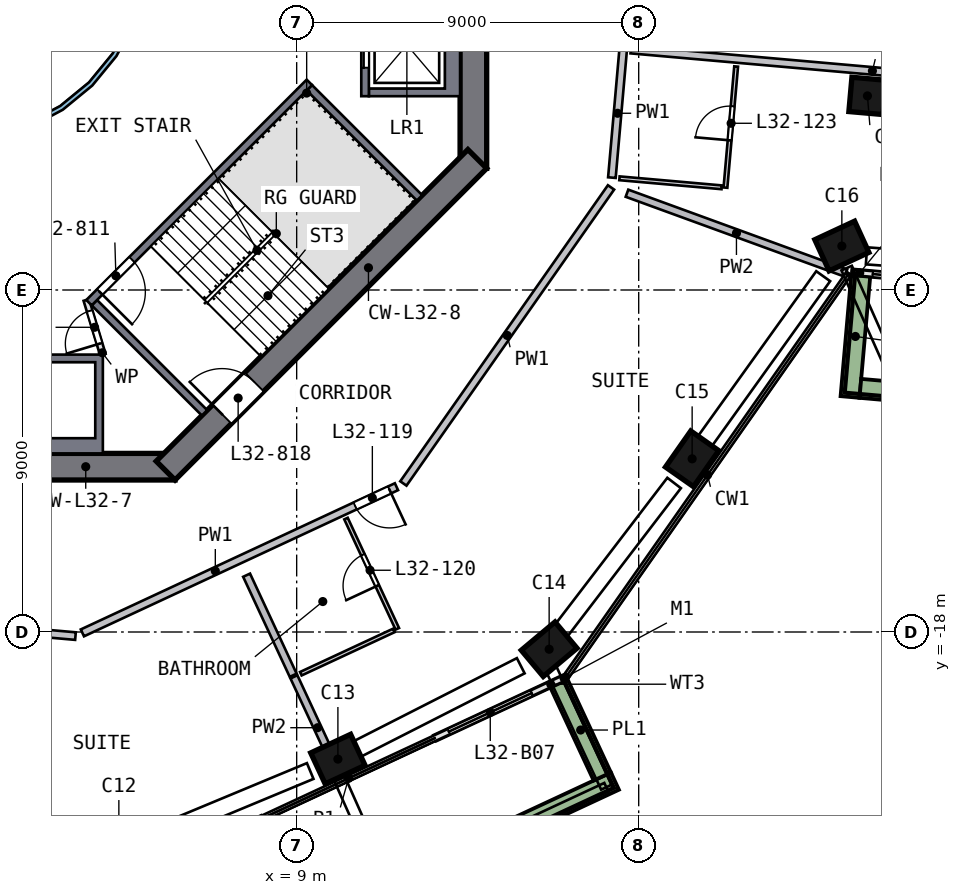
"""IFC4 building model, lengths in metres.
Left out: names, types, materials, properties, quantities, classifications, styles, units other than length and angle.
Written with IfcOpenShell. Run it as: python <this file> out.ifc"""

import sys

from ifc_helpers import new_model, si_unit, direction, frame, frame_2d, origin, origin_2d, place, context, subcontext, project, spatial, polyline, rectangle, outline, extrude, element, fill, save


model = new_model("IFC4")
c1 = context("Model", 3, precision=1e-05, world=origin(), true_north=direction((0.0, 1.0)))
c2 = subcontext(c1, "Body", "Model", "MODEL_VIEW")
j1 = project(units=[si_unit("LENGTHUNIT", "METRE"), si_unit("PLANEANGLEUNIT", "RADIAN")], contexts=[c1])
p1 = place(None, origin())
s1 = spatial("IfcSite", under=j1, at=p1, CompositionType="ELEMENT")
p2 = place(p1, origin())
s2 = spatial("IfcBuilding", under=s1, at=p2, CompositionType="ELEMENT")
p3 = place(p2, frame((0.0, 0.0, 136.5)))
s3 = spatial("IfcBuildingStorey", under=s2, at=p3, CompositionType="ELEMENT", Elevation=136.5)
p4 = place(p3, frame((9.962, -21.403, 0.0), z_axis=(0.101375651, 0.048216176, 0.993679112), x_axis=(0.90094221, 0.419168471, -0.112253848)))
e1 = element("IfcColumn", 1, at=p4, inside=s3, PredefinedType="COLUMN", context=c2, shape_type="SweptSolid", body=[
    extrude(rectangle(XDim=1.15, YDim=0.9, at=origin_2d()), origin(), (0.0, 0.0, 1.0), 3.21),
])
p5 = place(p3, frame((15.538, -18.543, 0.0), z_axis=(0.087582452, 0.074581932, 0.993361389), x_axis=(-0.761738409, -0.637591081, 0.115031341)))
e2 = element("IfcColumn", 2, at=p5, inside=s3, PredefinedType="COLUMN", context=c2, shape_type="SweptSolid", body=[
    extrude(rectangle(XDim=1.15, YDim=0.9, at=origin_2d()), origin(), (0.0, 0.0, 1.0), 3.211),
])
p6 = place(p3, frame((19.329, -13.555, 0.0), z_axis=(0.063730151, 0.092477164, 0.993673207), x_axis=(0.57078057, 0.813386058, -0.112306105)))
e3 = element("IfcColumn", 3, at=p6, inside=s3, PredefinedType="COLUMN", context=c2, shape_type="SweptSolid", body=[
    extrude(rectangle(XDim=1.15, YDim=0.9, at=origin_2d()), origin(), (0.0, 0.0, 1.0), 3.21),
])
p7 = place(p3, frame((23.301, -7.978, 0.0), z_axis=(0.037016078, 0.111048235, 0.99312542), x_axis=(-0.906670457, -0.414164203, 0.080104272)))
e4 = element("IfcColumn", 4, at=p7, inside=s3, PredefinedType="COLUMN", context=c2, shape_type="SweptSolid", body=[
    extrude(rectangle(XDim=1.15, YDim=0.9, at=origin_2d()), origin(), (0.0, 0.0, 1.0), 3.212),
])
p8 = place(p3, frame((23.997, -4.03, 0.0), z_axis=(0.01816876, 0.114333953, 0.993276217), x_axis=(0.996056181, -0.088358934, -0.008048798)))
e5 = element("IfcColumn", 5, at=p8, inside=s3, PredefinedType="COLUMN", context=c2, shape_type="SweptSolid", body=[
    extrude(rectangle(XDim=0.9, YDim=0.9, at=origin_2d()), origin(), (0.0, 0.0, 1.0), 3.211),
])
p9 = place(p3, frame((13.65, -5.799, 0.0), z_axis=(0.0, 0.0, 1.0), x_axis=(0.0, 1.0, 0.0)))
e6 = element("IfcWall", 6, at=p9, inside=s3, PredefinedType="SHEAR", context=c2, shape_type="SweptSolid", body=[
    extrude(rectangle(XDim=11.598, YDim=0.7, at=frame_2d((5.799, 0.0))), origin(), (0.0, 0.0, 1.0), 3.5),
])
p10 = place(p9, frame((4.899, 0.0, 0.0)))
e7 = element("IfcOpeningElement", 7, at=p10, cuts=e6, PredefinedType="OPENING", context=c2, shape_type="SweptSolid", body=[
    extrude(rectangle(XDim=1.8, YDim=2.1, at=frame_2d((0.9, 1.05))), frame((0.0, 0.36, 0.0), z_axis=(0.0, -1.0, 0.0), x_axis=(1.0, 0.0, 0.0)), (0.0, 0.0, 1.0), 0.72),
])
p11 = place(p3, frame((-5.799, -13.65, 0.0), z_axis=(0.0, 0.0, 1.0), x_axis=(1.0, 0.0, 0.0)))
e8 = element("IfcWall", 8, at=p11, inside=s3, PredefinedType="SHEAR", context=c2, shape_type="SweptSolid", body=[
    extrude(rectangle(XDim=11.598, YDim=0.7, at=frame_2d((5.799, 0.0))), origin(), (0.0, 0.0, 1.0), 3.5),
])
p12 = place(p11, frame((4.899, 0.0, 0.0)))
e9 = element("IfcOpeningElement", 9, at=p12, cuts=e8, PredefinedType="OPENING", context=c2, shape_type="SweptSolid", body=[
    extrude(rectangle(XDim=1.8, YDim=2.1, at=frame_2d((0.9, 1.05))), frame((0.0, 0.36, 0.0), z_axis=(0.0, -1.0, 0.0), x_axis=(1.0, 0.0, 0.0)), (0.0, 0.0, 1.0), 0.72),
])
p13 = place(p3, frame((5.552, -13.752, 0.0), z_axis=(0.0, 0.0, 1.0), x_axis=(0.707106781, 0.707106781, 0.0)))
e10 = element("IfcWall", 10, at=p13, inside=s3, PredefinedType="SHEAR", context=c2, shape_type="SweptSolid", body=[
    extrude(rectangle(XDim=11.598, YDim=0.7, at=frame_2d((5.799, 0.0))), origin(), (0.0, 0.0, 1.0), 3.5),
])
p14 = place(p13, frame((2.099, 0.0, 0.0)))
e11 = element("IfcOpeningElement", 11, at=p14, cuts=e10, PredefinedType="OPENING", context=c2, shape_type="SweptSolid", body=[
    extrude(rectangle(XDim=1.2, YDim=2.1, at=frame_2d((0.6, 1.05))), frame((0.0, 0.36, 0.0), z_axis=(0.0, -1.0, 0.0), x_axis=(1.0, 0.0, 0.0)), (0.0, 0.0, 1.0), 0.72),
])
p15 = place(p3, frame((12.644, -20.79, 0.0), z_axis=(0.0, 0.0, 1.0), x_axis=(0.906592913, 0.422006268, 0.0)))
e12 = element("IfcWall", 12, at=p15, inside=s3, PredefinedType="SOLIDWALL", context=c2, shape_type="SweptSolid", body=[
    extrude(rectangle(XDim=3.71, YDim=0.15, at=frame_2d((1.855, 0.0))), origin(), (0.0, 0.0, 1.0), 2.475),
])
p16 = place(p15, frame((0.4, 0.0, 0.0)))
e13 = element("IfcOpeningElement", 13, at=p16, cuts=e12, PredefinedType="OPENING", context=c2, shape_type="SweptSolid", body=[
    extrude(rectangle(XDim=2.4, YDim=2.4, at=frame_2d((1.2, 1.2))), frame((0.0, 0.085, 0.0), z_axis=(0.0, -1.0, 0.0), x_axis=(1.0, 0.0, 0.0)), (0.0, 0.0, 1.0), 0.17),
])
p17 = place(p3, frame((23.67, -8.537, 0.0), z_axis=(0.0, 0.0, 1.0), x_axis=(0.99613443, -0.087841889, 0.0)))
e14 = element("IfcWall", 14, at=p17, inside=s3, PredefinedType="SOLIDWALL", context=c2, shape_type="SweptSolid", body=[
    extrude(rectangle(XDim=3.293, YDim=0.15, at=frame_2d((1.647, 0.0))), origin(), (0.0, 0.0, 1.0), 2.475),
])
p18 = place(p17, frame((0.494, 0.0, 0.0)))
e15 = element("IfcOpeningElement", 15, at=p18, cuts=e14, PredefinedType="OPENING", context=c2, shape_type="SweptSolid", body=[
    extrude(rectangle(XDim=2.4, YDim=2.4, at=frame_2d((1.2, 1.2))), frame((0.0, 0.085, 0.0), z_axis=(0.0, -1.0, 0.0), x_axis=(1.0, 0.0, 0.0)), (0.0, 0.0, 1.0), 0.17),
])
p19 = place(p3, frame((4.933, -27.715, 0.0), z_axis=(0.0, 0.0, 1.0), x_axis=(0.906607173, 0.421975632, 0.0)))
e16 = element("IfcWall", 16, at=p19, inside=s3, PredefinedType="SOLIDWALL", context=c2, shape_type="SweptSolid", body=[
    extrude(rectangle(XDim=13.724, YDim=0.5, at=frame_2d((6.862, 0.0))), origin(), (0.0, 0.0, 1.0), 0.7),
])
p20 = place(p3, frame((17.042, -21.803, 0.0), z_axis=(0.0, 0.0, 1.0), x_axis=(-0.421998815, 0.906596382, 0.0)))
e17 = element("IfcWall", 17, at=p20, inside=s3, PredefinedType="SOLIDWALL", context=c2, shape_type="SweptSolid", body=[
    extrude(rectangle(XDim=2.699, YDim=0.5, at=frame_2d((1.35, 0.0))), origin(), (0.0, 0.0, 1.0), 0.7),
])
p21 = place(p3, frame((23.843, -8.629, 0.0), z_axis=(0.0, 0.0, 1.0), x_axis=(-0.08783813, -0.996134761, 0.0)))
e18 = element("IfcWall", 18, at=p21, inside=s3, PredefinedType="SOLIDWALL", context=c2, shape_type="SweptSolid", body=[
    extrude(rectangle(XDim=3.199, YDim=0.5, at=frame_2d((1.6, 0.0))), origin(), (0.0, 0.0, 1.0), 0.7),
])
p22 = place(p3, frame((23.833, -11.589, 0.0), z_axis=(0.0, 0.0, 1.0), x_axis=(0.996136805, -0.087814953, 0.0)))
e19 = element("IfcWall", 19, at=p22, inside=s3, PredefinedType="SOLIDWALL", context=c2, shape_type="SweptSolid", body=[
    extrude(rectangle(XDim=5.963, YDim=0.5, at=frame_2d((2.982, 0.0))), origin(), (0.0, 0.0, 1.0), 0.7),
])
p23 = place(p3, origin())
e20 = element("IfcWall", 20, at=p23, inside=s3, PredefinedType="SOLIDWALL", context=c2, shape_type="SweptSolid", body=[
    extrude(outline(polyline([(13.3, -3.9), (10.9, -3.9), (10.9, -3.7), (12.9, -3.7), (12.9, -1.4), (10.9, -1.4), (10.9, -1.2), (13.3, -1.2), (13.3, -3.9)])), origin(), (0.0, 0.0, 1.0), 3.19),
])
p24 = place(p3, frame((10.8, -1.2, 0.0), z_axis=(0.0, 0.0, 1.0), x_axis=(0.0, -1.0, 0.0)))
e21 = element("IfcWall", 21, at=p24, inside=s3, PredefinedType="SOLIDWALL", context=c2, shape_type="SweptSolid", body=[
    extrude(rectangle(XDim=2.7, YDim=0.2, at=frame_2d((1.35, 0.0))), origin(), (0.0, 0.0, 1.0), 3.19),
])
p25 = place(p24, frame((0.75, 0.0, 0.0)))
e22 = element("IfcOpeningElement", 22, at=p25, cuts=e21, PredefinedType="OPENING", context=c2, shape_type="SweptSolid", body=[
    extrude(rectangle(XDim=1.2, YDim=2.1, at=frame_2d((0.6, 1.05))), frame((0.0, 0.11, 0.0), z_axis=(0.0, -1.0, 0.0), x_axis=(1.0, 0.0, 0.0)), (0.0, 0.0, 1.0), 0.22),
])
p26 = place(p3, origin())
e23 = element("IfcWall", 23, at=p26, inside=s3, PredefinedType="SOLIDWALL", context=c2, shape_type="SweptSolid", body=[
    extrude(outline(polyline([(3.9, -10.7), (3.9, -13.3), (1.2, -13.3), (1.2, -10.7), (3.9, -10.7)]), holes=[polyline([(1.4, -12.9), (3.7, -12.9), (3.7, -10.9), (1.4, -10.9), (1.4, -12.9)])]), origin(), (0.0, 0.0, 1.0), 3.19),
])
p27 = place(p3, frame((9.334, -3.535, 0.0), z_axis=(0.0, 0.0, 1.0), x_axis=(-0.707106781, -0.707106781, 0.0)))
e24 = element("IfcWall", 24, at=p27, inside=s3, PredefinedType="SOLIDWALL", context=c2, shape_type="SweptSolid", body=[
    extrude(rectangle(XDim=8.2, YDim=0.2, at=frame_2d((4.1, 0.0))), origin(), (0.0, 0.0, 1.0), 3.19),
])
p28 = place(p27, frame((6.6, 0.0, 0.0)))
e25 = element("IfcOpeningElement", 25, at=p28, cuts=e24, PredefinedType="OPENING", context=c2, shape_type="SweptSolid", body=[
    extrude(rectangle(XDim=1.2, YDim=2.1, at=frame_2d((0.6, 1.05))), frame((0.0, 0.11, 0.0), z_axis=(0.0, -1.0, 0.0), x_axis=(1.0, 0.0, 0.0)), (0.0, 0.0, 1.0), 0.22),
])
for number, where, z_axis, x_axis in (
    (26, (3.677, -9.334, 0.0), (0.0, 0.0, 1.0), (0.707, -0.707, 0.0)),
    (27, (9.334, -3.677, 0.0), (0.0, 0.0, 1.0), (0.707, -0.707, 0.0)),
):
    element("IfcWall", number, at=place(p3, frame(where, z_axis=z_axis, x_axis=x_axis)), inside=s3, PredefinedType="SOLIDWALL", context=c2, shape_type="SweptSolid", body=[
        extrude(rectangle(XDim=4.1, YDim=0.2, at=frame_2d((2.05, 0.0))), origin(), (0.0, 0.0, 1.0), 3.19),
    ])
p29 = place(p3, frame((3.9, -10.7, 0.0), z_axis=(0.0, 0.0, 1.0), x_axis=(-0.289808785, 0.957084567, 0.0)))
e28 = element("IfcWall", 28, at=p29, inside=s3, PredefinedType="PARTITIONING", context=c2, shape_type="SweptSolid", body=[
    extrude(rectangle(XDim=1.501, YDim=0.15, at=frame_2d((0.75, 0.0))), origin(), (0.0, 0.0, 1.0), 3.19),
])
p30 = place(p29, frame((0.301, 0.0, 0.0)))
e29 = element("IfcOpeningElement", 29, at=p30, cuts=e28, PredefinedType="OPENING", context=c2, shape_type="SweptSolid", body=[
    extrude(rectangle(XDim=0.9, YDim=2.1, at=frame_2d((0.45, 1.05))), frame((0.0, 0.085, 0.0), z_axis=(0.0, -1.0, 0.0), x_axis=(1.0, 0.0, 0.0)), (0.0, 0.0, 1.0), 0.17),
])
p31 = place(p3, origin())
e30 = element("IfcWall", 30, at=p31, inside=s3, PredefinedType="SOLIDWALL", context=c2, shape_type="SweptSolid", body=[
    extrude(outline(polyline([(5.021, -0.999), (4.73, -1.959), (4.257, -2.844), (3.62, -3.62), (2.844, -4.257), (1.959, -4.73), (0.999, -5.021), (0.0, -5.12), (-0.999, -5.021), (-1.959, -4.73), (-2.844, -4.257), (-3.62, -3.62), (-4.257, -2.844), (-4.73, -1.959), (-5.021, -0.999), (-5.12, 0.0), (-5.021, 0.999), (-4.73, 1.959), (-4.257, 2.844), (-3.62, 3.62), (-2.844, 4.257), (-1.959, 4.73), (-0.999, 5.021), (0.0, 5.12), (0.999, 5.021), (1.959, 4.73), (2.844, 4.257), (3.62, 3.62), (4.257, 2.844), (4.73, 1.959), (5.021, 0.999), (5.12, 0.0), (5.021, -0.999)]), holes=[polyline([(4.904, 0.976), (4.619, 1.913), (4.157, 2.778), (3.535, 3.535), (2.778, 4.157), (1.913, 4.619), (0.976, 4.904), (0.0, 5.0), (-0.976, 4.904), (-1.913, 4.619), (-2.778, 4.157), (-3.535, 3.535), (-4.157, 2.778), (-4.619, 1.913), (-4.904, 0.976), (-5.0, 0.0), (-4.904, -0.976), (-4.619, -1.913), (-4.157, -2.778), (-3.535, -3.535), (-2.778, -4.157), (-1.913, -4.619), (-0.976, -4.904), (0.0, -5.0), (0.976, -4.904), (1.913, -4.619), (2.778, -4.157), (3.535, -3.535), (4.157, -2.778), (4.619, -1.913), (4.904, -0.976), (5.0, 0.0), (4.904, 0.976)])]), origin(), (0.0, 0.0, 1.0), 3.19),
])
p32 = place(p3, frame((3.179, -18.108, 0.0), z_axis=(0.0, 0.0, 1.0), x_axis=(-0.996131898, 0.087870599, 0.0)))
e31 = element("IfcWall", 31, at=p32, inside=s3, PredefinedType="SOLIDWALL", context=c2, shape_type="SweptSolid", body=[
    extrude(rectangle(XDim=9.516, YDim=0.2, at=frame_2d((4.758, 0.0))), origin(), (0.0, 0.0, 1.0), 3.19),
])
p33 = place(p32, frame((5.15, 0.0, 0.0)))
e32 = element("IfcOpeningElement", 32, at=p33, cuts=e31, PredefinedType="OPENING", context=c2, shape_type="SweptSolid", body=[
    extrude(rectangle(XDim=1.0, YDim=2.1, at=frame_2d((0.5, 1.05))), frame((0.0, 0.11, 0.0), z_axis=(0.0, -1.0, 0.0), x_axis=(1.0, 0.0, 0.0)), (0.0, 0.0, 1.0), 0.22),
])
p34 = place(p3, frame((11.626, -14.177, 0.0), z_axis=(0.0, 0.0, 1.0), x_axis=(-0.90660485, -0.421980622, 0.0)))
e33 = element("IfcWall", 33, at=p34, inside=s3, PredefinedType="SOLIDWALL", context=c2, shape_type="SweptSolid", body=[
    extrude(rectangle(XDim=9.116, YDim=0.2, at=frame_2d((4.558, 0.0))), origin(), (0.0, 0.0, 1.0), 3.19),
])
p35 = place(p34, frame((0.2, 0.0, 0.0)))
e34 = element("IfcOpeningElement", 34, at=p35, cuts=e33, PredefinedType="OPENING", context=c2, shape_type="SweptSolid", body=[
    extrude(rectangle(XDim=1.0, YDim=2.1, at=frame_2d((0.5, 1.05))), frame((0.0, 0.11, 0.0), z_axis=(0.0, -1.0, 0.0), x_axis=(1.0, 0.0, 0.0)), (0.0, 0.0, 1.0), 0.22),
])
p36 = place(p3, frame((11.808, -14.091, 0.0), z_axis=(0.0, 0.0, 1.0), x_axis=(0.574131966, 0.818762777, 0.0)))
e35 = element("IfcWall", 35, at=p36, inside=s3, PredefinedType="SOLIDWALL", context=c2, shape_type="SweptSolid", body=[
    extrude(rectangle(XDim=9.516, YDim=0.2, at=frame_2d((4.758, 0.0))), origin(), (0.0, 0.0, 1.0), 3.19),
])
p37 = place(p3, frame((17.294, -6.043, 0.0), z_axis=(0.0, 0.0, 1.0), x_axis=(0.087887524, 0.996130405, 0.0)))
e36 = element("IfcWall", 36, at=p37, inside=s3, PredefinedType="SOLIDWALL", context=c2, shape_type="SweptSolid", body=[
    extrude(rectangle(XDim=3.4, YDim=0.2, at=frame_2d((1.7, 0.0))), origin(), (0.0, 0.0, 1.0), 3.19),
])
p38 = place(p3, frame((17.792, -2.673, 0.0), z_axis=(0.0, 0.0, 1.0), x_axis=(0.996133396, -0.087853617, 0.0)))
e37 = element("IfcWall", 37, at=p38, inside=s3, PredefinedType="SOLIDWALL", context=c2, shape_type="SweptSolid", body=[
    extrude(rectangle(XDim=12.764, YDim=0.2, at=frame_2d((6.382, 0.0))), origin(), (0.0, 0.0, 1.0), 3.19),
])
p39 = place(p3, frame((7.683, -16.505, 0.0), z_axis=(0.0, 0.0, 1.0), x_axis=(0.421923577, -0.9066314, 0.0)))
e38 = element("IfcWall", 38, at=p39, inside=s3, PredefinedType="SOLIDWALL", context=c2, shape_type="SweptSolid", body=[
    extrude(rectangle(XDim=2.905, YDim=0.2, at=frame_2d((1.452, 0.0))), origin(), (0.0, 0.0, 1.0), 3.19),
])
p40 = place(p3, frame((8.928, -19.18, 0.0), z_axis=(0.0, 0.0, 1.0), x_axis=(0.421961604, -0.906613702, 0.0)))
e39 = element("IfcWall", 39, at=p40, inside=s3, PredefinedType="SOLIDWALL", context=c2, shape_type="SweptSolid", body=[
    extrude(rectangle(XDim=2.952, YDim=0.2, at=frame_2d((1.476, 0.0))), origin(), (0.0, 0.0, 1.0), 3.19),
])
p41 = place(p3, frame((17.692, -6.453, 0.0), z_axis=(0.0, 0.0, 1.0), x_axis=(0.939447682, -0.342692359, 0.0)))
e40 = element("IfcWall", 40, at=p41, inside=s3, PredefinedType="SOLIDWALL", context=c2, shape_type="SweptSolid", body=[
    extrude(rectangle(XDim=6.132, YDim=0.2, at=frame_2d((3.066, 0.0))), origin(), (0.0, 0.0, 1.0), 3.19),
])
p42 = place(p3, frame((11.558, -17.958, 0.0), z_axis=(0.0, 0.0, 1.0), x_axis=(-0.906591605, -0.422009078, 0.0)))
e41 = element("IfcWall", 41, at=p42, inside=s3, PredefinedType="PARTITIONING", context=c2, shape_type="SweptSolid", body=[
    extrude(rectangle(XDim=2.7, YDim=0.1, at=frame_2d((1.35, 0.0))), origin(), (0.0, 0.0, 1.0), 3.19),
])
p43 = place(p3, frame((11.648, -17.916, 0.0), z_axis=(0.0, 0.0, 1.0), x_axis=(-0.42192038, 0.906632888, 0.0)))
e42 = element("IfcWall", 42, at=p43, inside=s3, PredefinedType="PARTITIONING", context=c2, shape_type="SweptSolid", body=[
    extrude(rectangle(XDim=3.2, YDim=0.1, at=frame_2d((1.6, 0.0))), origin(), (0.0, 0.0, 1.0), 3.19),
])
p44 = place(p43, frame((1.25, 0.0, 0.0)))
e43 = element("IfcOpeningElement", 43, at=p44, cuts=e42, PredefinedType="OPENING", context=c2, shape_type="SweptSolid", body=[
    extrude(rectangle(XDim=0.9, YDim=2.1, at=frame_2d((0.45, 1.05))), frame((0.0, 0.06, 0.0), z_axis=(0.0, -1.0, 0.0), x_axis=(1.0, 0.0, 0.0)), (0.0, 0.0, 1.0), 0.12),
])
p45 = place(p3, frame((17.494, -6.06, 0.0), z_axis=(0.0, 0.0, 1.0), x_axis=(0.99612985, -0.08789381, 0.0)))
e44 = element("IfcWall", 44, at=p45, inside=s3, PredefinedType="PARTITIONING", context=c2, shape_type="SweptSolid", body=[
    extrude(rectangle(XDim=2.7, YDim=0.1, at=frame_2d((1.35, 0.0))), origin(), (0.0, 0.0, 1.0), 3.19),
])
p46 = place(p3, frame((20.283, -6.306, 0.0), z_axis=(0.0, 0.0, 1.0), x_axis=(0.08789381, 0.99612985, 0.0)))
e45 = element("IfcWall", 45, at=p46, inside=s3, PredefinedType="PARTITIONING", context=c2, shape_type="SweptSolid", body=[
    extrude(rectangle(XDim=3.2, YDim=0.1, at=frame_2d((1.6, 0.0))), origin(), (0.0, 0.0, 1.0), 3.19),
])
p47 = place(p46, frame((1.25, 0.0, 0.0)))
e46 = element("IfcOpeningElement", 46, at=p47, cuts=e45, PredefinedType="OPENING", context=c2, shape_type="SweptSolid", body=[
    extrude(rectangle(XDim=0.9, YDim=2.1, at=frame_2d((0.45, 1.05))), frame((0.0, 0.06, 0.0), z_axis=(0.0, -1.0, 0.0), x_axis=(1.0, 0.0, 0.0)), (0.0, 0.0, 1.0), 0.12),
])
p48 = place(p16, origin())
e47 = element("IfcDoor", 47, at=p48, inside=s3, OperationType="SLIDING_TO_RIGHT", PredefinedType="DOOR", context=c2, shape_type="SweptSolid", body=[
    extrude(rectangle(XDim=2.4, YDim=2.4, at=frame_2d((1.2, 1.2))), frame((0.0, 0.025, 0.0), z_axis=(0.0, -1.0, 0.0), x_axis=(1.0, 0.0, 0.0)), (0.0, 0.0, 1.0), 0.05),
])
fill(e13, e47)
p49 = place(p18, origin())
e48 = element("IfcDoor", 48, at=p49, inside=s3, OperationType="SLIDING_TO_LEFT", PredefinedType="DOOR", context=c2, shape_type="SweptSolid", body=[
    extrude(rectangle(XDim=2.4, YDim=2.4, at=frame_2d((1.2, 1.2))), frame((0.0, 0.025, 0.0), z_axis=(0.0, -1.0, 0.0), x_axis=(1.0, 0.0, 0.0)), (0.0, 0.0, 1.0), 0.05),
])
fill(e15, e48)
p50 = place(p25, origin())
e49 = element("IfcDoor", 49, at=p50, inside=s3, OperationType="DOUBLE_DOOR_SLIDING", PredefinedType="DOOR", context=c2, shape_type="SweptSolid", body=[
    extrude(rectangle(XDim=1.2, YDim=2.1, at=frame_2d((0.6, 1.05))), frame((0.0, 0.025, 0.0), z_axis=(0.0, -1.0, 0.0), x_axis=(1.0, 0.0, 0.0)), (0.0, 0.0, 1.0), 0.05),
])
fill(e22, e49)
p51 = place(p28, origin())
e50 = element("IfcDoor", 50, at=p51, inside=s3, OperationType="SINGLE_SWING_RIGHT", PredefinedType="DOOR", context=c2, shape_type="SweptSolid", body=[
    extrude(rectangle(XDim=1.2, YDim=2.1, at=frame_2d((0.6, 1.05))), frame((0.0, 0.025, 0.0), z_axis=(0.0, -1.0, 0.0), x_axis=(1.0, 0.0, 0.0)), (0.0, 0.0, 1.0), 0.05),
])
fill(e25, e50)
p52 = place(p14, origin())
e51 = element("IfcDoor", 51, at=p52, inside=s3, OperationType="SINGLE_SWING_LEFT", PredefinedType="DOOR", context=c2, shape_type="SweptSolid", body=[
    extrude(rectangle(XDim=1.2, YDim=2.1, at=frame_2d((0.6, 1.05))), frame((0.0, 0.025, 0.0), z_axis=(0.0, -1.0, 0.0), x_axis=(1.0, 0.0, 0.0)), (0.0, 0.0, 1.0), 0.05),
])
fill(e11, e51)
p53 = place(p30, origin())
e52 = element("IfcDoor", 52, at=p53, inside=s3, OperationType="SINGLE_SWING_LEFT", PredefinedType="DOOR", context=c2, shape_type="SweptSolid", body=[
    extrude(rectangle(XDim=0.9, YDim=2.1, at=frame_2d((0.45, 1.05))), frame((0.0, 0.025, 0.0), z_axis=(0.0, -1.0, 0.0), x_axis=(1.0, 0.0, 0.0)), (0.0, 0.0, 1.0), 0.05),
])
fill(e29, e52)
p54 = place(p35, origin())
e53 = element("IfcDoor", 53, at=p54, inside=s3, OperationType="SINGLE_SWING_LEFT", PredefinedType="DOOR", context=c2, shape_type="SweptSolid", body=[
    extrude(rectangle(XDim=1.0, YDim=2.1, at=frame_2d((0.5, 1.05))), frame((0.0, 0.025, 0.0), z_axis=(0.0, -1.0, 0.0), x_axis=(1.0, 0.0, 0.0)), (0.0, 0.0, 1.0), 0.05),
])
fill(e34, e53)
p55 = place(p44, origin())
e54 = element("IfcDoor", 54, at=p55, inside=s3, OperationType="SINGLE_SWING_LEFT", PredefinedType="DOOR", context=c2, shape_type="SweptSolid", body=[
    extrude(rectangle(XDim=0.9, YDim=2.1, at=frame_2d((0.45, 1.05))), frame((0.0, 0.025, 0.0), z_axis=(0.0, -1.0, 0.0), x_axis=(1.0, 0.0, 0.0)), (0.0, 0.0, 1.0), 0.05),
])
fill(e43, e54)
p56 = place(p47, origin())
e55 = element("IfcDoor", 55, at=p56, inside=s3, OperationType="SINGLE_SWING_LEFT", PredefinedType="DOOR", context=c2, shape_type="SweptSolid", body=[
    extrude(rectangle(XDim=0.9, YDim=2.1, at=frame_2d((0.45, 1.05))), frame((0.0, 0.025, 0.0), z_axis=(0.0, -1.0, 0.0), x_axis=(1.0, 0.0, 0.0)), (0.0, 0.0, 1.0), 0.05),
])
fill(e46, e55)
save(model, sys.argv[1])
